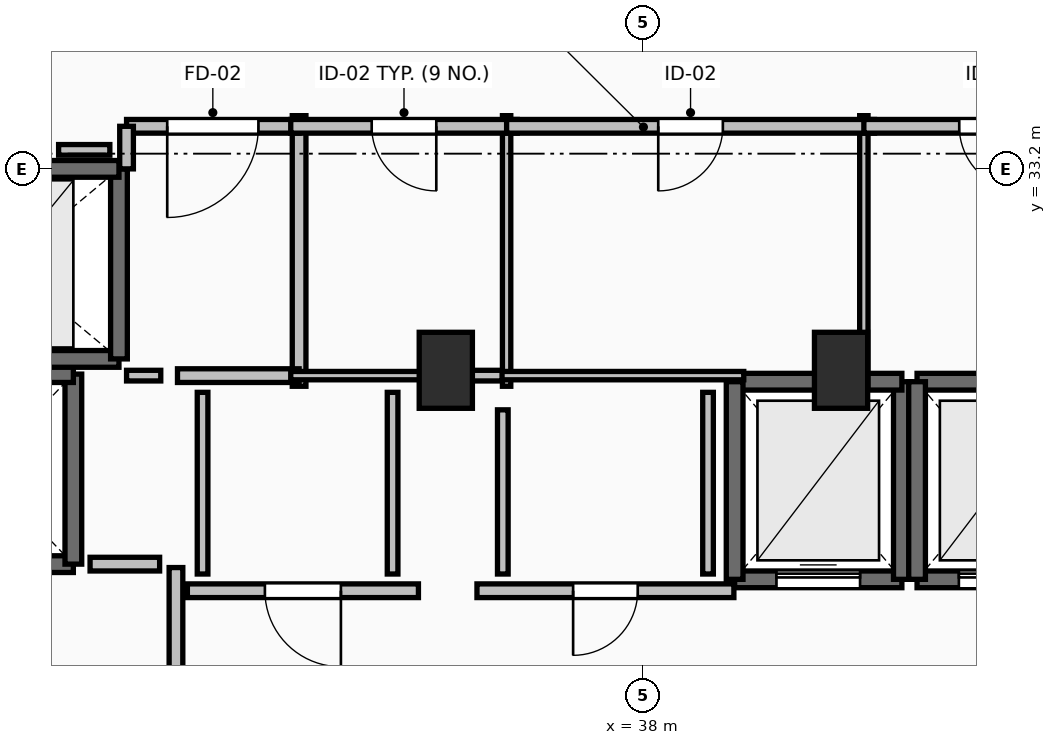
"""IFC4 building model, lengths in metres.
Left out: names, types, materials, properties, quantities, classifications, styles, units other than length and angle.
Written with IfcOpenShell. Run it as: python <this file> out.ifc"""

import sys

from ifc_helpers import new_model, si_unit, direction, frame, frame_2d, origin, origin_2d, place, context, subcontext, project, spatial, rectangle, extrude, element, fill, save


model = new_model("IFC4")
c1 = context("Model", 3, precision=1e-05, world=origin(), true_north=direction((0.0, 1.0)))
c2 = subcontext(c1, "Body", "Model", "MODEL_VIEW")
j1 = project(units=[si_unit("LENGTHUNIT", "METRE"), si_unit("PLANEANGLEUNIT", "RADIAN")], contexts=[c1])
p1 = place(None, origin())
s1 = spatial("IfcSite", under=j1, at=p1, CompositionType="ELEMENT")
p2 = place(p1, origin())
s2 = spatial("IfcBuilding", under=s1, at=p2, CompositionType="ELEMENT")
p3 = place(p2, frame((0.0, 0.0, 229.75)))
s3 = spatial("IfcBuildingStorey", under=s2, at=p3, CompositionType="ELEMENT", Elevation=229.75)
for number, where, z_axis, x_axis in (
    (1, (35.4, 30.55, 0.0), (0.0, 0.0, 1.0), (1.0, 0.0, 0.0)),
    (2, (40.6, 30.55, 0.0), (0.0, 0.0, 1.0), (1.0, 0.0, 0.0)),
):
    element("IfcColumn", number, at=place(p3, frame(where, z_axis=z_axis, x_axis=x_axis)), inside=s3, PredefinedType="PILASTER", context=c2, shape_type="SweptSolid", body=[
        extrude(rectangle(XDim=0.7, YDim=1.0, at=origin_2d()), origin(), (0.0, 0.0, 1.0), 4.5),
    ])
p4 = place(p3, frame((39.2, 27.8, 0.0), z_axis=(0.0, 0.0, 1.0), x_axis=(1.0, 0.0, 0.0)))
e3 = element("IfcWall", 3, at=p4, inside=s3, PredefinedType="SOLIDWALL", context=c2, shape_type="SweptSolid", body=[
    extrude(rectangle(XDim=2.2, YDim=0.22, at=frame_2d((1.1, 0.0))), origin(), (0.0, 0.0, 1.0), 4.24),
])
p5 = place(p4, frame((0.55, 0.0, 0.0)))
e4 = element("IfcOpeningElement", 4, at=p5, cuts=e3, PredefinedType="OPENING", context=c2, shape_type="SweptSolid", body=[
    extrude(rectangle(XDim=1.1, YDim=2.2, at=frame_2d((0.55, 1.1))), frame((0.0, 0.125, 0.0), z_axis=(0.0, -1.0, 0.0), x_axis=(1.0, 0.0, 0.0)), (0.0, 0.0, 1.0), 0.25),
])
p6 = place(p3, frame((41.4, 27.8, 0.0), z_axis=(0.0, 0.0, 1.0), x_axis=(0.0, 1.0, 0.0)))
e5 = element("IfcWall", 5, at=p6, inside=s3, PredefinedType="SOLIDWALL", context=c2, shape_type="SweptSolid", body=[
    extrude(rectangle(XDim=2.6, YDim=0.22, at=frame_2d((1.3, 0.0))), origin(), (0.0, 0.0, 1.0), 4.24),
])
p7 = place(p3, frame((41.4, 30.4, 0.0), z_axis=(0.0, 0.0, 1.0), x_axis=(-1.0, 0.0, 0.0)))
e6 = element("IfcWall", 6, at=p7, inside=s3, PredefinedType="SOLIDWALL", context=c2, shape_type="SweptSolid", body=[
    extrude(rectangle(XDim=2.2, YDim=0.22, at=frame_2d((1.1, 0.0))), origin(), (0.0, 0.0, 1.0), 4.24),
])
p8 = place(p3, frame((39.2, 30.4, 0.0), z_axis=(0.0, 0.0, 1.0), x_axis=(0.0, -1.0, 0.0)))
e7 = element("IfcWall", 7, at=p8, inside=s3, PredefinedType="SOLIDWALL", context=c2, shape_type="SweptSolid", body=[
    extrude(rectangle(XDim=2.6, YDim=0.22, at=frame_2d((1.3, 0.0))), origin(), (0.0, 0.0, 1.0), 4.24),
])
p9 = place(p3, frame((41.6, 27.8, 0.0), z_axis=(0.0, 0.0, 1.0), x_axis=(1.0, 0.0, 0.0)))
e8 = element("IfcWall", 8, at=p9, inside=s3, PredefinedType="SOLIDWALL", context=c2, shape_type="SweptSolid", body=[
    extrude(rectangle(XDim=2.2, YDim=0.22, at=frame_2d((1.1, 0.0))), origin(), (0.0, 0.0, 1.0), 4.24),
])
p10 = place(p9, frame((0.55, 0.0, 0.0)))
e9 = element("IfcOpeningElement", 9, at=p10, cuts=e8, PredefinedType="OPENING", context=c2, shape_type="SweptSolid", body=[
    extrude(rectangle(XDim=1.1, YDim=2.2, at=frame_2d((0.55, 1.1))), frame((0.0, 0.125, 0.0), z_axis=(0.0, -1.0, 0.0), x_axis=(1.0, 0.0, 0.0)), (0.0, 0.0, 1.0), 0.25),
])
p11 = place(p3, frame((43.8, 30.4, 0.0), z_axis=(0.0, 0.0, 1.0), x_axis=(-1.0, 0.0, 0.0)))
e10 = element("IfcWall", 10, at=p11, inside=s3, PredefinedType="SOLIDWALL", context=c2, shape_type="SweptSolid", body=[
    extrude(rectangle(XDim=2.2, YDim=0.22, at=frame_2d((1.1, 0.0))), origin(), (0.0, 0.0, 1.0), 4.24),
])
p12 = place(p3, frame((41.6, 30.4, 0.0), z_axis=(0.0, 0.0, 1.0), x_axis=(0.0, -1.0, 0.0)))
e11 = element("IfcWall", 11, at=p12, inside=s3, PredefinedType="SOLIDWALL", context=c2, shape_type="SweptSolid", body=[
    extrude(rectangle(XDim=2.6, YDim=0.22, at=frame_2d((1.3, 0.0))), origin(), (0.0, 0.0, 1.0), 4.24),
])
p13 = place(p3, frame((28.1, 28.0, 0.0), z_axis=(0.0, 0.0, 1.0), x_axis=(1.0, 0.0, 0.0)))
e12 = element("IfcWall", 12, at=p13, inside=s3, PredefinedType="SHEAR", context=c2, shape_type="SweptSolid", body=[
    extrude(rectangle(XDim=2.4, YDim=0.22, at=frame_2d((1.2, 0.0))), origin(), (0.0, 0.0, 1.0), 4.24),
])
p14 = place(p13, frame((0.6, 0.0, 0.0)))
e13 = element("IfcOpeningElement", 13, at=p14, cuts=e12, PredefinedType="OPENING", context=c2, shape_type="SweptSolid", body=[
    extrude(rectangle(XDim=1.2, YDim=2.2, at=frame_2d((0.6, 1.1))), frame((0.0, 0.125, 0.0), z_axis=(0.0, -1.0, 0.0), x_axis=(1.0, 0.0, 0.0)), (0.0, 0.0, 1.0), 0.25),
])
p15 = place(p3, frame((30.5, 28.0, 0.0), z_axis=(0.0, 0.0, 1.0), x_axis=(0.0, 1.0, 0.0)))
e14 = element("IfcWall", 14, at=p15, inside=s3, PredefinedType="SHEAR", context=c2, shape_type="SweptSolid", body=[
    extrude(rectangle(XDim=2.5, YDim=0.22, at=frame_2d((1.25, 0.0))), origin(), (0.0, 0.0, 1.0), 4.24),
])
p16 = place(p3, frame((30.5, 30.5, 0.0), z_axis=(0.0, 0.0, 1.0), x_axis=(-1.0, 0.0, 0.0)))
e15 = element("IfcWall", 15, at=p16, inside=s3, PredefinedType="SHEAR", context=c2, shape_type="SweptSolid", body=[
    extrude(rectangle(XDim=2.4, YDim=0.22, at=frame_2d((1.2, 0.0))), origin(), (0.0, 0.0, 1.0), 4.24),
])
p17 = place(p3, frame((28.1, 30.7, 0.0), z_axis=(0.0, 0.0, 1.0), x_axis=(1.0, 0.0, 0.0)))
e16 = element("IfcWall", 16, at=p17, inside=s3, PredefinedType="SOLIDWALL", context=c2, shape_type="SweptSolid", body=[
    extrude(rectangle(XDim=3.0, YDim=0.22, at=frame_2d((1.5, 0.0))), origin(), (0.0, 0.0, 1.0), 4.24),
])
p18 = place(p3, frame((31.1, 30.7, 0.0), z_axis=(0.0, 0.0, 1.0), x_axis=(0.0, 1.0, 0.0)))
e17 = element("IfcWall", 17, at=p18, inside=s3, PredefinedType="SOLIDWALL", context=c2, shape_type="SweptSolid", body=[
    extrude(rectangle(XDim=2.5, YDim=0.22, at=frame_2d((1.25, 0.0))), origin(), (0.0, 0.0, 1.0), 4.24),
])
p19 = place(p3, frame((31.1, 33.2, 0.0), z_axis=(0.0, 0.0, 1.0), x_axis=(-1.0, 0.0, 0.0)))
e18 = element("IfcWall", 18, at=p19, inside=s3, PredefinedType="SOLIDWALL", context=c2, shape_type="SweptSolid", body=[
    extrude(rectangle(XDim=3.0, YDim=0.22, at=frame_2d((1.5, 0.0))), origin(), (0.0, 0.0, 1.0), 4.24),
])
p20 = place(p19, frame((0.9, 0.0, 0.0)))
e19 = element("IfcOpeningElement", 19, at=p20, cuts=e18, PredefinedType="OPENING", context=c2, shape_type="SweptSolid", body=[
    extrude(rectangle(XDim=1.2, YDim=2.2, at=frame_2d((0.6, 1.1))), frame((0.0, 0.125, 0.0), z_axis=(0.0, -1.0, 0.0), x_axis=(1.0, 0.0, 0.0)), (0.0, 0.0, 1.0), 0.25),
])
p21 = place(p3, frame((31.85, 24.045, 0.0), z_axis=(0.0, 0.0, 1.0), x_axis=(0.0, 1.0, 0.0)))
e20 = element("IfcWall", 20, at=p21, inside=s3, PredefinedType="PARTITIONING", context=c2, shape_type="SweptSolid", body=[
    extrude(rectangle(XDim=3.91, YDim=0.18, at=frame_2d((1.955, 0.0))), origin(), (0.0, 0.0, 1.0), 4.24),
])
p22 = place(p21, frame((1.355, 0.0, 0.0)))
e21 = element("IfcOpeningElement", 21, at=p22, cuts=e20, PredefinedType="OPENING", context=c2, shape_type="SweptSolid", body=[
    extrude(rectangle(XDim=1.2, YDim=2.15, at=frame_2d((0.6, 1.075))), frame((0.0, 0.105, 0.0), z_axis=(0.0, -1.0, 0.0), x_axis=(1.0, 0.0, 0.0)), (0.0, 0.0, 1.0), 0.21),
])
p23 = place(p3, frame((33.47, 30.34, 0.0), z_axis=(0.0, 0.0, 1.0), x_axis=(0.0, 1.0, 0.0)))
e22 = element("IfcWall", 22, at=p23, inside=s3, PredefinedType="PARTITIONING", context=c2, shape_type="SweptSolid", body=[
    extrude(rectangle(XDim=3.56, YDim=0.18, at=frame_2d((1.78, 0.0))), origin(), (0.0, 0.0, 1.0), 4.24),
])
p24 = place(p3, frame((31.87, 30.48, 0.0), z_axis=(0.0, 0.0, 1.0), x_axis=(1.0, 0.0, 0.0)))
e23 = element("IfcWall", 23, at=p24, inside=s3, PredefinedType="PARTITIONING", context=c2, shape_type="SweptSolid", body=[
    extrude(rectangle(XDim=1.6, YDim=0.18, at=frame_2d((0.8, 0.0))), origin(), (0.0, 0.0, 1.0), 4.24),
])
p25 = place(p3, frame((33.47, 33.76, 0.0), z_axis=(0.0, 0.0, 1.0), x_axis=(-1.0, 0.0, 0.0)))
e24 = element("IfcWall", 24, at=p25, inside=s3, PredefinedType="PARTITIONING", context=c2, shape_type="SweptSolid", body=[
    extrude(rectangle(XDim=2.27, YDim=0.18, at=frame_2d((1.135, 0.0))), origin(), (0.0, 0.0, 1.0), 4.24),
])
p26 = place(p25, frame((0.535, 0.0, 0.0)))
e25 = element("IfcOpeningElement", 25, at=p26, cuts=e24, PredefinedType="OPENING", context=c2, shape_type="SweptSolid", body=[
    extrude(rectangle(XDim=1.2, YDim=2.15, at=frame_2d((0.6, 1.075))), frame((0.0, 0.105, 0.0), z_axis=(0.0, -1.0, 0.0), x_axis=(1.0, 0.0, 0.0)), (0.0, 0.0, 1.0), 0.21),
])
p27 = place(p3, frame((31.2, 33.76, 0.0), z_axis=(0.0, 0.0, 1.0), x_axis=(0.0, -1.0, 0.0)))
e26 = element("IfcWall", 26, at=p27, inside=s3, PredefinedType="PARTITIONING", context=c2, shape_type="SweptSolid", body=[
    extrude(rectangle(XDim=0.56, YDim=0.18, at=frame_2d((0.28, 0.0))), origin(), (0.0, 0.0, 1.0), 4.24),
])
p28 = place(p3, frame((35.04, 27.65, 0.0), z_axis=(0.0, 0.0, 1.0), x_axis=(-1.0, 0.0, 0.0)))
e27 = element("IfcWall", 27, at=p28, inside=s3, PredefinedType="PARTITIONING", context=c2, shape_type="SweptSolid", body=[
    extrude(rectangle(XDim=3.04, YDim=0.18, at=frame_2d((1.52, 0.0))), origin(), (0.0, 0.0, 1.0), 4.24),
])
p29 = place(p28, frame((1.02, 0.0, 0.0)))
e28 = element("IfcOpeningElement", 28, at=p29, cuts=e27, PredefinedType="OPENING", context=c2, shape_type="SweptSolid", body=[
    extrude(rectangle(XDim=1.0, YDim=2.15, at=frame_2d((0.5, 1.075))), frame((0.0, 0.105, 0.0), z_axis=(0.0, -1.0, 0.0), x_axis=(1.0, 0.0, 0.0)), (0.0, 0.0, 1.0), 0.21),
])
p30 = place(p3, frame((39.19, 27.65, 0.0), z_axis=(0.0, 0.0, 1.0), x_axis=(-1.0, 0.0, 0.0)))
e29 = element("IfcWall", 29, at=p30, inside=s3, PredefinedType="PARTITIONING", context=c2, shape_type="SweptSolid", body=[
    extrude(rectangle(XDim=3.38, YDim=0.18, at=frame_2d((1.69, 0.0))), origin(), (0.0, 0.0, 1.0), 4.24),
])
p31 = place(p30, frame((1.265, 0.0, 0.0)))
e30 = element("IfcOpeningElement", 30, at=p31, cuts=e29, PredefinedType="OPENING", context=c2, shape_type="SweptSolid", body=[
    extrude(rectangle(XDim=0.85, YDim=2.1, at=frame_2d((0.425, 1.05))), frame((0.0, 0.105, 0.0), z_axis=(0.0, -1.0, 0.0), x_axis=(1.0, 0.0, 0.0)), (0.0, 0.0, 1.0), 0.21),
])
p32 = place(p3, frame((36.2, 30.34, 0.0), z_axis=(0.0, 0.0, 1.0), x_axis=(0.0, 1.0, 0.0)))
e31 = element("IfcWall", 31, at=p32, inside=s3, PredefinedType="PARTITIONING", context=c2, shape_type="SweptSolid", body=[
    extrude(rectangle(XDim=3.56, YDim=0.11, at=frame_2d((1.78, 0.0))), origin(), (0.0, 0.0, 1.0), 3.432),
])
p33 = place(p3, frame((33.36, 30.48, 0.0), z_axis=(0.0, 0.0, 1.0), x_axis=(1.0, 0.0, 0.0)))
e32 = element("IfcWall", 32, at=p33, inside=s3, PredefinedType="PARTITIONING", context=c2, shape_type="SweptSolid", body=[
    extrude(rectangle(XDim=1.81, YDim=0.11, at=frame_2d((0.905, 0.0))), origin(), (0.0, 0.0, 1.0), 4.24),
])
p34 = place(p3, frame((36.34, 33.76, 0.0), z_axis=(0.0, 0.0, 1.0), x_axis=(-1.0, 0.0, 0.0)))
e33 = element("IfcWall", 33, at=p34, inside=s3, PredefinedType="PARTITIONING", context=c2, shape_type="SweptSolid", body=[
    extrude(rectangle(XDim=2.98, YDim=0.18, at=frame_2d((1.49, 0.0))), origin(), (0.0, 0.0, 1.0), 4.24),
])
p35 = place(p34, frame((1.065, 0.0, 0.0)))
e34 = element("IfcOpeningElement", 34, at=p35, cuts=e33, PredefinedType="OPENING", context=c2, shape_type="SweptSolid", body=[
    extrude(rectangle(XDim=0.85, YDim=2.1, at=frame_2d((0.425, 1.05))), frame((0.0, 0.105, 0.0), z_axis=(0.0, -1.0, 0.0), x_axis=(1.0, 0.0, 0.0)), (0.0, 0.0, 1.0), 0.21),
])
p36 = place(p3, frame((40.9, 30.34, 0.0), z_axis=(0.0, 0.0, 1.0), x_axis=(0.0, 1.0, 0.0)))
e35 = element("IfcWall", 35, at=p36, inside=s3, PredefinedType="PARTITIONING", context=c2, shape_type="SweptSolid", body=[
    extrude(rectangle(XDim=3.56, YDim=0.11, at=frame_2d((1.78, 0.0))), origin(), (0.0, 0.0, 1.0), 4.24),
])
p37 = place(p3, frame((36.11, 30.48, 0.0), z_axis=(0.0, 0.0, 1.0), x_axis=(1.0, 0.0, 0.0)))
e36 = element("IfcWall", 36, at=p37, inside=s3, PredefinedType="PARTITIONING", context=c2, shape_type="SweptSolid", body=[
    extrude(rectangle(XDim=3.21, YDim=0.11, at=frame_2d((1.605, 0.0))), origin(), (0.0, 0.0, 1.0), 3.432),
])
p38 = place(p3, frame((41.04, 33.76, 0.0), z_axis=(0.0, 0.0, 1.0), x_axis=(-1.0, 0.0, 0.0)))
e37 = element("IfcWall", 37, at=p38, inside=s3, PredefinedType="PARTITIONING", context=c2, shape_type="SweptSolid", body=[
    extrude(rectangle(XDim=4.84, YDim=0.18, at=frame_2d((2.42, 0.0))), origin(), (0.0, 0.0, 1.0), 4.24),
])
p39 = place(p38, frame((1.995, 0.0, 0.0)))
e38 = element("IfcOpeningElement", 38, at=p39, cuts=e37, PredefinedType="OPENING", context=c2, shape_type="SweptSolid", body=[
    extrude(rectangle(XDim=0.85, YDim=2.1, at=frame_2d((0.425, 1.05))), frame((0.0, 0.105, 0.0), z_axis=(0.0, -1.0, 0.0), x_axis=(1.0, 0.0, 0.0)), (0.0, 0.0, 1.0), 0.21),
])
p40 = place(p3, frame((44.26, 33.76, 0.0), z_axis=(0.0, 0.0, 1.0), x_axis=(-1.0, 0.0, 0.0)))
e39 = element("IfcWall", 39, at=p40, inside=s3, PredefinedType="PARTITIONING", context=c2, shape_type="SweptSolid", body=[
    extrude(rectangle(XDim=3.36, YDim=0.18, at=frame_2d((1.68, 0.0))), origin(), (0.0, 0.0, 1.0), 4.24),
])
p41 = place(p40, frame((1.255, 0.0, 0.0)))
e40 = element("IfcOpeningElement", 40, at=p41, cuts=e39, PredefinedType="OPENING", context=c2, shape_type="SweptSolid", body=[
    extrude(rectangle(XDim=0.85, YDim=2.1, at=frame_2d((0.425, 1.05))), frame((0.0, 0.105, 0.0), z_axis=(0.0, -1.0, 0.0), x_axis=(1.0, 0.0, 0.0)), (0.0, 0.0, 1.0), 0.21),
])
p42 = place(p3, frame((31.635, 28.0, 0.0), z_axis=(0.0, 0.0, 1.0), x_axis=(-1.0, 0.0, 0.0)))
e41 = element("IfcWall", 41, at=p42, inside=s3, PredefinedType="PARTITIONING", context=c2, shape_type="SweptSolid", body=[
    extrude(rectangle(XDim=0.915, YDim=0.18, at=frame_2d((0.458, 0.0))), origin(), (0.0, 0.0, 1.0), 4.24),
])
p43 = place(p3, frame((31.2, 30.48, 0.0), z_axis=(0.0, 0.0, 1.0), x_axis=(1.0, 0.0, 0.0)))
e42 = element("IfcWall", 42, at=p43, inside=s3, PredefinedType="PARTITIONING", context=c2, shape_type="SweptSolid", body=[
    extrude(rectangle(XDim=0.45, YDim=0.14, at=frame_2d((0.225, 0.0))), origin(), (0.0, 0.0, 1.0), 4.24),
])
p44 = place(p3, frame((35.14, 30.48, 0.0), z_axis=(0.0, 0.0, 1.0), x_axis=(1.0, 0.0, 0.0)))
e43 = element("IfcWall", 43, at=p44, inside=s3, PredefinedType="PARTITIONING", context=c2, shape_type="SweptSolid", body=[
    extrude(rectangle(XDim=1.0, YDim=0.14, at=frame_2d((0.5, 0.0))), origin(), (0.0, 0.0, 1.0), 3.432),
])
for number, where, z_axis, x_axis in (
    (44, (32.2, 30.26, 0.0), (0.0, 0.0, 1.0), (0.0, -1.0, 0.0)),
    (45, (34.7, 27.87, 0.0), (0.0, 0.0, 1.0), (0.0, 1.0, 0.0)),
):
    element("IfcWall", number, at=place(p3, frame(where, z_axis=z_axis, x_axis=x_axis)), inside=s3, PredefinedType="PARTITIONING", context=c2, shape_type="SweptSolid", body=[
        extrude(rectangle(XDim=2.39, YDim=0.14, at=frame_2d((1.195, 0.0))), origin(), (0.0, 0.0, 1.0), 4.24),
    ])
p45 = place(p3, frame((36.15, 30.03, 0.0), z_axis=(0.0, 0.0, 1.0), x_axis=(0.0, -1.0, 0.0)))
e46 = element("IfcWall", 46, at=p45, inside=s3, PredefinedType="PARTITIONING", context=c2, shape_type="SweptSolid", body=[
    extrude(rectangle(XDim=2.16, YDim=0.14, at=frame_2d((1.08, 0.0))), origin(), (0.0, 0.0, 1.0), 4.24),
])
p46 = place(p3, frame((38.85, 27.87, 0.0), z_axis=(0.0, 0.0, 1.0), x_axis=(0.0, 1.0, 0.0)))
e47 = element("IfcWall", 47, at=p46, inside=s3, PredefinedType="PARTITIONING", context=c2, shape_type="SweptSolid", body=[
    extrude(rectangle(XDim=2.39, YDim=0.14, at=frame_2d((1.195, 0.0))), origin(), (0.0, 0.0, 1.0), 4.24),
])
p47 = place(p3, frame((30.98, 33.45, 0.0), z_axis=(0.0, 0.0, 1.0), x_axis=(-1.0, 0.0, 0.0)))
e48 = element("IfcWall", 48, at=p47, inside=s3, PredefinedType="PARTITIONING", context=c2, shape_type="SweptSolid", body=[
    extrude(rectangle(XDim=0.674, YDim=0.14, at=frame_2d((0.337, 0.0))), origin(), (0.0, 0.0, 1.0), 4.24),
])
p48 = place(p5, origin())
e49 = element("IfcDoor", 49, at=p48, inside=s3, OperationType="SLIDING_TO_LEFT", PredefinedType="DOOR", context=c2, shape_type="SweptSolid", body=[
    extrude(rectangle(XDim=1.1, YDim=2.2, at=frame_2d((0.55, 1.1))), frame((0.0, 0.025, 0.0), z_axis=(0.0, -1.0, 0.0), x_axis=(1.0, 0.0, 0.0)), (0.0, 0.0, 1.0), 0.05),
])
fill(e4, e49)
p49 = place(p10, origin())
e50 = element("IfcDoor", 50, at=p49, inside=s3, OperationType="SLIDING_TO_LEFT", PredefinedType="DOOR", context=c2, shape_type="SweptSolid", body=[
    extrude(rectangle(XDim=1.1, YDim=2.2, at=frame_2d((0.55, 1.1))), frame((0.0, 0.025, 0.0), z_axis=(0.0, -1.0, 0.0), x_axis=(1.0, 0.0, 0.0)), (0.0, 0.0, 1.0), 0.05),
])
fill(e9, e50)
p50 = place(p26, origin())
e51 = element("IfcDoor", 51, at=p50, inside=s3, OperationType="SINGLE_SWING_RIGHT", PredefinedType="DOOR", context=c2, shape_type="SweptSolid", body=[
    extrude(rectangle(XDim=1.2, YDim=2.15, at=frame_2d((0.6, 1.075))), frame((0.0, 0.025, 0.0), z_axis=(0.0, -1.0, 0.0), x_axis=(1.0, 0.0, 0.0)), (0.0, 0.0, 1.0), 0.05),
])
fill(e25, e51)
p51 = place(p29, origin())
e52 = element("IfcDoor", 52, at=p51, inside=s3, OperationType="SINGLE_SWING_LEFT", PredefinedType="DOOR", context=c2, shape_type="SweptSolid", body=[
    extrude(rectangle(XDim=1.0, YDim=2.15, at=frame_2d((0.5, 1.075))), frame((0.0, 0.025, 0.0), z_axis=(0.0, -1.0, 0.0), x_axis=(1.0, 0.0, 0.0)), (0.0, 0.0, 1.0), 0.05),
])
fill(e28, e52)
p52 = place(p31, origin())
e53 = element("IfcDoor", 53, at=p52, inside=s3, OperationType="SINGLE_SWING_RIGHT", PredefinedType="DOOR", context=c2, shape_type="SweptSolid", body=[
    extrude(rectangle(XDim=0.85, YDim=2.1, at=frame_2d((0.425, 1.05))), frame((0.0, 0.025, 0.0), z_axis=(0.0, -1.0, 0.0), x_axis=(1.0, 0.0, 0.0)), (0.0, 0.0, 1.0), 0.05),
])
fill(e30, e53)
p53 = place(p35, origin())
e54 = element("IfcDoor", 54, at=p53, inside=s3, OperationType="SINGLE_SWING_LEFT", PredefinedType="DOOR", context=c2, shape_type="SweptSolid", body=[
    extrude(rectangle(XDim=0.85, YDim=2.1, at=frame_2d((0.425, 1.05))), frame((0.0, 0.025, 0.0), z_axis=(0.0, -1.0, 0.0), x_axis=(1.0, 0.0, 0.0)), (0.0, 0.0, 1.0), 0.05),
])
fill(e34, e54)
p54 = place(p39, origin())
e55 = element("IfcDoor", 55, at=p54, inside=s3, OperationType="SINGLE_SWING_RIGHT", PredefinedType="DOOR", context=c2, shape_type="SweptSolid", body=[
    extrude(rectangle(XDim=0.85, YDim=2.1, at=frame_2d((0.425, 1.05))), frame((0.0, 0.025, 0.0), z_axis=(0.0, -1.0, 0.0), x_axis=(1.0, 0.0, 0.0)), (0.0, 0.0, 1.0), 0.05),
])
fill(e38, e55)
p55 = place(p41, origin())
e56 = element("IfcDoor", 56, at=p55, inside=s3, OperationType="SINGLE_SWING_LEFT", PredefinedType="DOOR", context=c2, shape_type="SweptSolid", body=[
    extrude(rectangle(XDim=0.85, YDim=2.1, at=frame_2d((0.425, 1.05))), frame((0.0, 0.025, 0.0), z_axis=(0.0, -1.0, 0.0), x_axis=(1.0, 0.0, 0.0)), (0.0, 0.0, 1.0), 0.05),
])
fill(e40, e56)
save(model, sys.argv[1])
